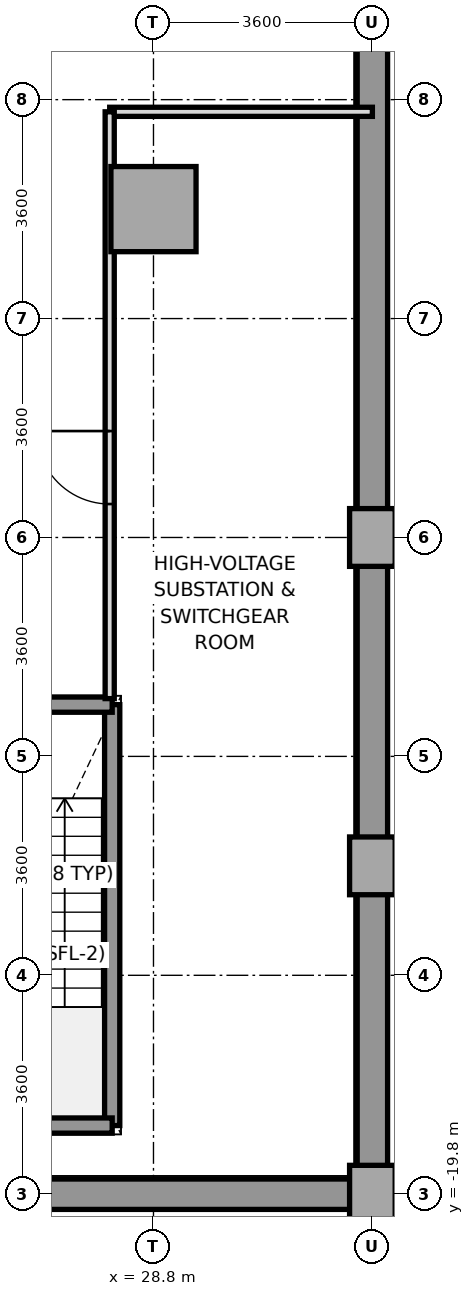
"""IFC4 building model, lengths in metres.
Left out: names, types, materials, properties, quantities, classifications, styles, units other than length and angle.
Written with IfcOpenShell. Run it as: python <this file> out.ifc"""

import sys

from ifc_helpers import new_model, si_unit, direction, frame, frame_2d, origin, origin_2d, place, context, subcontext, project, spatial, rectangle, extrude, source, transform, mapped, element, fill, save


model = new_model("IFC4")
c1 = context("Model", 3, precision=1e-05, world=origin(), true_north=direction((0.0, 1.0)))
c2 = subcontext(c1, "Body", "Model", "MODEL_VIEW")
j1 = project(units=[si_unit("LENGTHUNIT", "METRE"), si_unit("PLANEANGLEUNIT", "RADIAN")], contexts=[c1])
p1 = place(None, origin())
s1 = spatial("IfcSite", under=j1, at=p1, CompositionType="ELEMENT")
p2 = place(p1, origin())
s2 = spatial("IfcBuilding", under=s1, at=p2, CompositionType="ELEMENT")
p3 = place(p2, frame((0.0, 0.0, -8.4)))
s3 = spatial("IfcBuildingStorey", under=s2, at=p3, CompositionType="ELEMENT", Elevation=-8.4)
m1 = source(origin(), c2, "Body", "SweptSolid", [
    extrude(rectangle(XDim=1.4, YDim=1.4, at=origin_2d()), origin(), (0.0, 0.0, 1.0), 4.12),
])
p4 = place(p3, frame((28.8, -3.6, -0.2), z_axis=(0.0, 0.0, 1.0), x_axis=(1.0, 0.0, 0.0)))
e1 = element("IfcColumn", 1, at=p4, inside=s3, PredefinedType="COLUMN", context=c2, shape_type="MappedRepresentation", body=[
    mapped(m1, transform((0.0, 0.0, 0.0), x_axis=(1.0, 0.0, 0.0), y_axis=(0.0, 1.0, 0.0), z_axis=(0.0, 0.0, 1.0), scale=1.0)),
])
m2 = source(origin(), c2, "Body", "SweptSolid", [
    extrude(rectangle(XDim=0.75, YDim=0.95, at=origin_2d()), origin(), (0.0, 0.0, 1.0), 4.12),
])
for number, where, z_axis, x_axis in (
    (2, (32.4, -19.8, -0.2), (0.0, 0.0, 1.0), (1.0, 0.0, 0.0)),
    (3, (32.4, -14.4, -0.2), (0.0, 0.0, 1.0), (1.0, 0.0, 0.0)),
    (4, (32.4, -9.0, -0.2), (0.0, 0.0, 1.0), (1.0, 0.0, 0.0)),
):
    element("IfcColumn", number, at=place(p3, frame(where, z_axis=z_axis, x_axis=x_axis)), inside=s3, PredefinedType="COLUMN", context=c2, shape_type="MappedRepresentation", body=[
        mapped(m2, transform((0.0, 0.0, 0.0), x_axis=(1.0, 0.0, 0.0), y_axis=(0.0, 1.0, 0.0), z_axis=(0.0, 0.0, 1.0), scale=1.0)),
    ])
p5 = place(p3, frame((-32.4, -19.8, -0.2), z_axis=(0.0, 0.0, 1.0), x_axis=(1.0, 0.0, 0.0)))
e5 = element("IfcWall", 5, at=p5, inside=s3, PredefinedType="USERDEFINED", context=c2, shape_type="SweptSolid", body=[
    extrude(rectangle(XDim=64.8, YDim=0.5, at=frame_2d((32.4, 0.0))), origin(), (0.0, 0.0, 1.0), 4.12),
])
p6 = place(p3, frame((32.4, -19.8, -0.2), z_axis=(0.0, 0.0, 1.0), x_axis=(0.0, 1.0, 0.0)))
e6 = element("IfcWall", 6, at=p6, inside=s3, PredefinedType="USERDEFINED", context=c2, shape_type="SweptSolid", body=[
    extrude(rectangle(XDim=43.2, YDim=0.5, at=frame_2d((21.6, 0.0))), origin(), (0.0, 0.0, 1.0), 4.12),
])
p7 = place(p3, frame((28.121, -18.671, -0.2), z_axis=(0.0, 0.0, 1.0), x_axis=(0.0, 1.0, 0.0)))
e7 = element("IfcWall", 7, at=p7, inside=s3, PredefinedType="SOLIDWALL", context=c2, shape_type="SweptSolid", body=[
    extrude(rectangle(XDim=6.922, YDim=0.25, at=frame_2d((3.461, 0.0))), origin(), (0.0, 0.0, 1.0), 4.12),
])
p8 = place(p3, frame((24.999, -18.671, -0.2), z_axis=(0.0, 0.0, 1.0), x_axis=(1.0, 0.0, 0.0)))
e8 = element("IfcWall", 8, at=p8, inside=s3, PredefinedType="SOLIDWALL", context=c2, shape_type="SweptSolid", body=[
    extrude(rectangle(XDim=3.122, YDim=0.25, at=frame_2d((1.561, 0.0))), origin(), (0.0, 0.0, 1.0), 4.12),
])
p9 = place(p3, frame((24.999, -11.749, -0.2), z_axis=(0.0, 0.0, 1.0), x_axis=(1.0, 0.0, 0.0)))
e9 = element("IfcWall", 9, at=p9, inside=s3, PredefinedType="SOLIDWALL", context=c2, shape_type="SweptSolid", body=[
    extrude(rectangle(XDim=3.122, YDim=0.25, at=frame_2d((1.561, 0.0))), origin(), (0.0, 0.0, 1.0), 4.12),
])
p10 = place(p9, frame((0.8, 0.0, 0.2)))
e10 = element("IfcOpeningElement", 10, at=p10, cuts=e9, PredefinedType="OPENING", context=c2, shape_type="SweptSolid", body=[
    extrude(rectangle(XDim=1.2, YDim=2.2, at=frame_2d((0.6, 1.1))), frame((0.0, 0.135, 0.0), z_axis=(0.0, -1.0, 0.0), x_axis=(1.0, 0.0, 0.0)), (0.0, 0.0, 1.0), 0.27),
])
p11 = place(p3, frame((28.08, -2.0, 0.0), z_axis=(0.0, 0.0, 1.0), x_axis=(1.0, 0.0, 0.0)))
e11 = element("IfcWall", 11, at=p11, inside=s3, PredefinedType="PARTITIONING", context=c2, shape_type="SweptSolid", body=[
    extrude(rectangle(XDim=4.32, YDim=0.15, at=frame_2d((2.16, 0.0))), origin(), (0.0, 0.0, 1.0), 3.33),
])
p12 = place(p3, frame((28.08, -11.65, 0.0), z_axis=(0.0, 0.0, 1.0), x_axis=(0.0, 1.0, 0.0)))
e12 = element("IfcWall", 12, at=p12, inside=s3, PredefinedType="PARTITIONING", context=c2, shape_type="SweptSolid", body=[
    extrude(rectangle(XDim=9.65, YDim=0.15, at=frame_2d((4.825, 0.0))), origin(), (0.0, 0.0, 1.0), 3.27),
])
p13 = place(p12, frame((3.2, 0.0, 0.0)))
e13 = element("IfcOpeningElement", 13, at=p13, cuts=e12, PredefinedType="OPENING", context=c2, shape_type="SweptSolid", body=[
    extrude(rectangle(XDim=1.2, YDim=2.2, at=frame_2d((0.6, 1.1))), frame((0.0, 0.085, 0.0), z_axis=(0.0, -1.0, 0.0), x_axis=(1.0, 0.0, 0.0)), (0.0, 0.0, 1.0), 0.17),
])
m3 = source(origin(), c2, "Body", "SweptSolid", [
    extrude(rectangle(XDim=1.2, YDim=2.2, at=frame_2d((0.6, 1.1))), frame((0.0, 0.025, 0.0), z_axis=(0.0, -1.0, 0.0), x_axis=(1.0, 0.0, 0.0)), (0.0, 0.0, 1.0), 0.05),
])
p14 = place(p13, origin())
e14 = element("IfcDoor", 14, at=p14, inside=s3, OperationType="SINGLE_SWING_RIGHT", PredefinedType="DOOR", context=c2, shape_type="MappedRepresentation", body=[
    mapped(m3, transform((0.0, 0.0, 0.0), x_axis=(1.0, 0.0, 0.0), y_axis=(0.0, 1.0, 0.0), z_axis=(0.0, 0.0, 1.0), scale=1.0)),
])
fill(e13, e14)
save(model, sys.argv[1])
